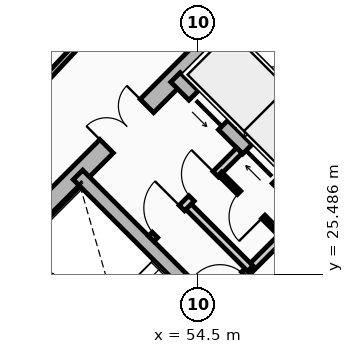
"""IFC4 building model, lengths in metres.
Left out: names, types, materials, properties, quantities, classifications, styles, units other than length and angle.
Written with IfcOpenShell. Run it as: python <this file> out.ifc"""

import sys

from ifc_helpers import new_model, si_unit, direction, frame, frame_2d, origin, place, context, subcontext, project, spatial, rectangle, extrude, source, transform, mapped, element, fill, save


model = new_model("IFC4")
c1 = context("Model", 3, precision=1e-05, world=origin(), true_north=direction((0.0, 1.0)))
c2 = subcontext(c1, "Body", "Model", "MODEL_VIEW")
j1 = project(units=[si_unit("LENGTHUNIT", "METRE"), si_unit("PLANEANGLEUNIT", "RADIAN")], contexts=[c1])
p1 = place(None, origin())
s1 = spatial("IfcSite", under=j1, at=p1, CompositionType="ELEMENT")
p2 = place(p1, origin())
s2 = spatial("IfcBuilding", under=s1, at=p2, CompositionType="ELEMENT")
p3 = place(p2, frame((0.0, 0.0, 62.74)))
s3 = spatial("IfcBuildingStorey", under=s2, at=p3, CompositionType="ELEMENT", Elevation=62.74)
for number, where, z_axis, x_axis in (
    (1, (58.773, 15.661, 0.0), (0.0, 0.0, 1.0), (-0.707, 0.707, 0.0)),
    (2, (66.339, 23.227, 0.0), (0.0, 0.0, 1.0), (-0.707, 0.707, 0.0)),
):
    element("IfcWall", number, at=place(p3, frame(where, z_axis=z_axis, x_axis=x_axis)), inside=s3, PredefinedType="SHEAR", context=c2, shape_type="SweptSolid", body=[
        extrude(rectangle(XDim=14.3, YDim=0.5, at=frame_2d((7.15, 0.0))), origin(), (0.0, 0.0, 1.0), 2.91),
    ])
p4 = place(p3, frame((48.838, 25.596, 0.0), z_axis=(0.0, 0.0, 1.0), x_axis=(0.707106781187, 0.707106781187, 0.0)))
e3 = element("IfcWall", 3, at=p4, inside=s3, PredefinedType="SHEAR", context=c2, shape_type="SweptSolid", body=[
    extrude(rectangle(XDim=10.7, YDim=0.5, at=frame_2d((5.35, 0.0))), origin(), (0.0, 0.0, 1.0), 2.91),
])
m1 = source(origin(), c2, "Body", "SweptSolid", [
    extrude(rectangle(XDim=1.5, YDim=2.02, at=frame_2d((0.75, 1.01))), frame((0.0, 0.26, 0.0), z_axis=(0.0, -1.0, 0.0), x_axis=(1.0, 0.0, 0.0)), (0.0, 0.0, 1.0), 0.52),
])
p5 = place(p4, frame((4.6, 0.0, 0.0)))
e4 = element("IfcOpeningElement", 4, at=p5, cuts=e3, PredefinedType="OPENING", context=c2, shape_type="MappedRepresentation", body=[
    mapped(m1, transform((0.0, 0.0, 0.0), x_axis=(1.0, 0.0, 0.0), y_axis=(0.0, 1.0, 0.0), z_axis=(0.0, 0.0, 1.0), scale=1.0)),
])
p6 = place(p3, frame((61.096, 18.338, 0.0), z_axis=(0.0, 0.0, 1.0), x_axis=(-0.707106781187, 0.707106781187, 0.0)))
e5 = element("IfcWall", 5, at=p6, inside=s3, PredefinedType="SHEAR", context=c2, shape_type="SweptSolid", body=[
    extrude(rectangle(XDim=13.8, YDim=0.35, at=frame_2d((6.9, 0.0))), origin(), (0.0, 0.0, 1.0), 2.91),
])
m2 = source(origin(), c2, "Body", "SweptSolid", [
    extrude(rectangle(XDim=1.1, YDim=2.015, at=frame_2d((0.55, 1.007))), frame((0.0, 0.185, 0.0), z_axis=(0.0, -1.0, 0.0), x_axis=(1.0, 0.0, 0.0)), (0.0, 0.0, 1.0), 0.37),
])
p7 = place(p6, frame((4.9, 0.0, 0.0)))
e6 = element("IfcOpeningElement", 6, at=p7, cuts=e5, PredefinedType="OPENING", context=c2, shape_type="MappedRepresentation", body=[
    mapped(m2, transform((0.0, 0.0, 0.0), x_axis=(1.0, 0.0, 0.0), y_axis=(0.0, 1.0, 0.0), z_axis=(0.0, 0.0, 1.0), scale=1.0)),
])
m3 = source(origin(), c2, "Body", "SweptSolid", [
    extrude(rectangle(XDim=1.15, YDim=2.02, at=frame_2d((0.575, 1.01))), frame((0.0, 0.185, 0.0), z_axis=(0.0, -1.0, 0.0), x_axis=(1.0, 0.0, 0.0)), (0.0, 0.0, 1.0), 0.37),
])
p8 = place(p6, frame((7.32, 0.0, 0.0)))
e7 = element("IfcOpeningElement", 7, at=p8, cuts=e5, PredefinedType="OPENING", context=c2, shape_type="MappedRepresentation", body=[
    mapped(m3, transform((0.0, 0.0, 0.0), x_axis=(1.0, 0.0, 0.0), y_axis=(0.0, 1.0, 0.0), z_axis=(0.0, 0.0, 1.0), scale=1.0)),
])
p9 = place(p3, frame((63.662, 20.904, 0.0), z_axis=(0.0, 0.0, 1.0), x_axis=(-0.707106781187, 0.707106781187, 0.0)))
e8 = element("IfcWall", 8, at=p9, inside=s3, PredefinedType="SHEAR", context=c2, shape_type="SweptSolid", body=[
    extrude(rectangle(XDim=13.8, YDim=0.35, at=frame_2d((6.9, 0.0))), origin(), (0.0, 0.0, 1.0), 2.91),
])
p10 = place(p9, frame((10.025, 0.0, 0.0)))
e9 = element("IfcOpeningElement", 9, at=p10, cuts=e8, PredefinedType="OPENING", context=c2, shape_type="MappedRepresentation", body=[
    mapped(m2, transform((0.0, 0.0, 0.0), x_axis=(1.0, 0.0, 0.0), y_axis=(0.0, 1.0, 0.0), z_axis=(0.0, 0.0, 1.0), scale=1.0)),
])
p11 = place(p9, frame((12.025, 0.0, 0.0)))
e10 = element("IfcOpeningElement", 10, at=p11, cuts=e8, PredefinedType="OPENING", context=c2, shape_type="MappedRepresentation", body=[
    mapped(m2, transform((0.0, 0.0, 0.0), x_axis=(1.0, 0.0, 0.0), y_axis=(0.0, 1.0, 0.0), z_axis=(0.0, 0.0, 1.0), scale=1.0)),
])
p12 = place(p9, frame((5.33, 0.0, 0.0)))
e11 = element("IfcOpeningElement", 11, at=p12, cuts=e8, PredefinedType="OPENING", context=c2, shape_type="MappedRepresentation", body=[
    mapped(m3, transform((0.0, 0.0, 0.0), x_axis=(1.0, 0.0, 0.0), y_axis=(0.0, 1.0, 0.0), z_axis=(0.0, 0.0, 1.0), scale=1.0)),
])
p13 = place(p3, frame((53.922, 21.141, 0.0), z_axis=(0.0, 0.0, 1.0), x_axis=(-0.707106781187, 0.707106781187, 0.0)))
e12 = element("IfcWall", 12, at=p13, inside=s3, PredefinedType="SHEAR", context=c2, shape_type="SweptSolid", body=[
    extrude(rectangle(XDim=6.745, YDim=0.35, at=frame_2d((3.373, 0.0))), origin(), (0.0, 0.0, 1.0), 2.91),
])
p14 = place(p3, frame((55.615, 29.227, 0.0), z_axis=(0.0, 0.0, 1.0), x_axis=(0.707147878904, 0.70706568108, 0.0)))
e13 = element("IfcWall", 13, at=p14, inside=s3, PredefinedType="SHEAR", context=c2, shape_type="SweptSolid", body=[
    extrude(rectangle(XDim=2.97, YDim=0.2, at=frame_2d((1.485, 0.0))), origin(), (0.0, 0.0, 1.0), 2.91),
])
p15 = place(p3, frame((57.419, 31.2, 0.0), z_axis=(0.0, 0.0, 1.0), x_axis=(-0.707032117043, 0.707181437447, 0.0)))
e14 = element("IfcWall", 14, at=p15, inside=s3, PredefinedType="SHEAR", context=c2, shape_type="SweptSolid", body=[
    extrude(rectangle(XDim=1.635, YDim=0.2, at=frame_2d((0.817, 0.0))), origin(), (0.0, 0.0, 1.0), 2.91),
])
p16 = place(p3, frame((54.961, 24.719, 0.0), z_axis=(0.0, 0.0, 1.0), x_axis=(0.707106781187, 0.707106781187, 0.0)))
e15 = element("IfcWall", 15, at=p16, inside=s3, PredefinedType="PARTITIONING", context=c2, shape_type="SweptSolid", body=[
    extrude(rectangle(XDim=3.28, YDim=0.2, at=frame_2d((1.64, 0.0))), origin(), (0.0, 0.0, 1.0), 2.555),
])
m4 = source(origin(), c2, "Body", "SweptSolid", [
    extrude(rectangle(XDim=0.9, YDim=2.005, at=frame_2d((0.45, 1.002))), frame((0.0, 0.11, 0.0), z_axis=(0.0, -1.0, 0.0), x_axis=(1.0, 0.0, 0.0)), (0.0, 0.0, 1.0), 0.22),
])
p17 = place(p16, frame((0.16, 0.0, 0.0)))
e16 = element("IfcOpeningElement", 16, at=p17, cuts=e15, PredefinedType="OPENING", context=c2, shape_type="MappedRepresentation", body=[
    mapped(m4, transform((0.0, 0.0, 0.0), x_axis=(1.0, 0.0, 0.0), y_axis=(0.0, 1.0, 0.0), z_axis=(0.0, 0.0, 1.0), scale=1.0)),
])
p18 = place(p3, frame((55.874, 25.631, 0.0), z_axis=(0.0, 0.0, 1.0), x_axis=(-0.707157639372, 0.707055919343, 0.0)))
e17 = element("IfcWall", 17, at=p18, inside=s3, PredefinedType="PARTITIONING", context=c2, shape_type="SweptSolid", body=[
    extrude(rectangle(XDim=2.4, YDim=0.2, at=frame_2d((1.2, 0.0))), origin(), (0.0, 0.0, 1.0), 2.555),
])
p19 = place(p3, frame((53.264, 26.416, 0.0), z_axis=(0.0, 0.0, 1.0), x_axis=(0.707106781187, 0.707106781187, 0.0)))
e18 = element("IfcWall", 18, at=p19, inside=s3, PredefinedType="PARTITIONING", context=c2, shape_type="SweptSolid", body=[
    extrude(rectangle(XDim=3.28, YDim=0.2, at=frame_2d((1.64, 0.0))), origin(), (0.0, 0.0, 1.0), 2.555),
])
m5 = source(origin(), c2, "Body", "SweptSolid", [
    extrude(rectangle(XDim=1.0, YDim=2.015, at=frame_2d((0.5, 1.007))), frame((0.0, 0.11, 0.0), z_axis=(0.0, -1.0, 0.0), x_axis=(1.0, 0.0, 0.0)), (0.0, 0.0, 1.0), 0.22),
])
p20 = place(p19, frame((0.14, 0.0, 0.0)))
e19 = element("IfcOpeningElement", 19, at=p20, cuts=e18, PredefinedType="OPENING", context=c2, shape_type="MappedRepresentation", body=[
    mapped(m5, transform((0.0, 0.0, 0.0), x_axis=(1.0, 0.0, 0.0), y_axis=(0.0, 1.0, 0.0), z_axis=(0.0, 0.0, 1.0), scale=1.0)),
])
p21 = place(p19, frame((1.5, 0.0, 0.0)))
e20 = element("IfcOpeningElement", 20, at=p21, cuts=e18, PredefinedType="OPENING", context=c2, shape_type="MappedRepresentation", body=[
    mapped(m4, transform((0.0, 0.0, 0.0), x_axis=(1.0, 0.0, 0.0), y_axis=(0.0, 1.0, 0.0), z_axis=(0.0, 0.0, 1.0), scale=1.0)),
])
p22 = place(p3, frame((56.673, 26.529, 0.0), z_axis=(0.0, 0.0, 1.0), x_axis=(-0.707052764397, 0.70716079385, 0.0)))
e21 = element("IfcWall", 21, at=p22, inside=s3, PredefinedType="PARTITIONING", context=c2, shape_type="SweptSolid", body=[
    extrude(rectangle(XDim=2.26, YDim=0.125, at=frame_2d((1.13, 0.0))), origin(), (0.0, 0.0, 1.0), 2.555),
])
m6 = source(origin(), c2, "Body", "SweptSolid", [
    extrude(rectangle(XDim=0.9, YDim=2.005, at=frame_2d((0.45, 1.002))), frame((0.0, 0.073, 0.0), z_axis=(0.0, -1.0, 0.0), x_axis=(1.0, 0.0, 0.0)), (0.0, 0.0, 1.0), 0.145),
])
p23 = place(p22, frame((0.65, 0.0, 0.0)))
e22 = element("IfcOpeningElement", 22, at=p23, cuts=e21, PredefinedType="OPENING", context=c2, shape_type="MappedRepresentation", body=[
    mapped(m6, transform((0.0, 0.0, 0.0), x_axis=(1.0, 0.0, 0.0), y_axis=(0.0, 1.0, 0.0), z_axis=(0.0, 0.0, 1.0), scale=1.0)),
])
p24 = place(p3, frame((52.043, 32.28, 0.0), z_axis=(0.0, 0.0, 1.0), x_axis=(-0.682606081633, -0.730786519661, 0.0)))
e23 = element("IfcWall", 23, at=p24, inside=s3, PredefinedType="PARTITIONING", context=c2, shape_type="SweptSolid", body=[
    extrude(rectangle(XDim=6.527, YDim=0.15, at=frame_2d((3.263, 0.0))), origin(), (0.0, 0.0, 1.0), 2.079),
])
m7 = source(origin(), c2, "Body", "SweptSolid", [
    extrude(rectangle(XDim=1.1, YDim=2.015, at=frame_2d((0.55, 1.007))), frame((0.0, 0.025, 0.0), z_axis=(0.0, -1.0, 0.0), x_axis=(1.0, 0.0, 0.0)), (0.0, 0.0, 1.0), 0.05),
])
p25 = place(p10, origin())
e24 = element("IfcDoor", 24, at=p25, inside=s3, OperationType="SLIDING_TO_RIGHT", PredefinedType="DOOR", context=c2, shape_type="MappedRepresentation", body=[
    mapped(m7, transform((0.0, 0.0, 0.0), x_axis=(1.0, 0.0, 0.0), y_axis=(0.0, 1.0, 0.0), z_axis=(0.0, 0.0, 1.0), scale=1.0)),
])
fill(e9, e24)
p26 = place(p11, origin())
e25 = element("IfcDoor", 25, at=p26, inside=s3, OperationType="SLIDING_TO_LEFT", PredefinedType="DOOR", context=c2, shape_type="MappedRepresentation", body=[
    mapped(m7, transform((0.0, 0.0, 0.0), x_axis=(1.0, 0.0, 0.0), y_axis=(0.0, 1.0, 0.0), z_axis=(0.0, 0.0, 1.0), scale=1.0)),
])
fill(e10, e25)
m8 = source(origin(), c2, "Body", "SweptSolid", [
    extrude(rectangle(XDim=1.5, YDim=2.02, at=frame_2d((0.75, 1.01))), frame((0.0, 0.025, 0.0), z_axis=(0.0, -1.0, 0.0), x_axis=(1.0, 0.0, 0.0)), (0.0, 0.0, 1.0), 0.05),
])
p27 = place(p5, origin())
e26 = element("IfcDoor", 26, at=p27, inside=s3, OperationType="DOUBLE_DOOR_SINGLE_SWING", PredefinedType="DOOR", context=c2, shape_type="MappedRepresentation", body=[
    mapped(m8, transform((0.0, 0.0, 0.0), x_axis=(1.0, 0.0, 0.0), y_axis=(0.0, 1.0, 0.0), z_axis=(0.0, 0.0, 1.0), scale=1.0)),
])
fill(e4, e26)
m9 = source(origin(), c2, "Body", "SweptSolid", [
    extrude(rectangle(XDim=0.9, YDim=2.005, at=frame_2d((0.45, 1.002))), frame((0.0, 0.025, 0.0), z_axis=(0.0, -1.0, 0.0), x_axis=(1.0, 0.0, 0.0)), (0.0, 0.0, 1.0), 0.05),
])
p28 = place(p17, origin())
e27 = element("IfcDoor", 27, at=p28, inside=s3, OperationType="SINGLE_SWING_LEFT", PredefinedType="DOOR", context=c2, shape_type="MappedRepresentation", body=[
    mapped(m9, transform((0.0, 0.0, 0.0), x_axis=(1.0, 0.0, 0.0), y_axis=(0.0, 1.0, 0.0), z_axis=(0.0, 0.0, 1.0), scale=1.0)),
])
fill(e16, e27)
m10 = source(origin(), c2, "Body", "SweptSolid", [
    extrude(rectangle(XDim=1.0, YDim=2.015, at=frame_2d((0.5, 1.007))), frame((0.0, 0.025, 0.0), z_axis=(0.0, -1.0, 0.0), x_axis=(1.0, 0.0, 0.0)), (0.0, 0.0, 1.0), 0.05),
])
p29 = place(p20, origin())
e28 = element("IfcDoor", 28, at=p29, inside=s3, OperationType="SINGLE_SWING_RIGHT", PredefinedType="DOOR", context=c2, shape_type="MappedRepresentation", body=[
    mapped(m10, transform((0.0, 0.0, 0.0), x_axis=(1.0, 0.0, 0.0), y_axis=(0.0, 1.0, 0.0), z_axis=(0.0, 0.0, 1.0), scale=1.0)),
])
fill(e19, e28)
p30 = place(p21, origin())
e29 = element("IfcDoor", 29, at=p30, inside=s3, OperationType="SINGLE_SWING_RIGHT", PredefinedType="DOOR", context=c2, shape_type="MappedRepresentation", body=[
    mapped(m9, transform((0.0, 0.0, 0.0), x_axis=(1.0, 0.0, 0.0), y_axis=(0.0, 1.0, 0.0), z_axis=(0.0, 0.0, 1.0), scale=1.0)),
])
fill(e20, e29)
p31 = place(p23, origin())
e30 = element("IfcDoor", 30, at=p31, inside=s3, OperationType="SINGLE_SWING_LEFT", PredefinedType="DOOR", context=c2, shape_type="MappedRepresentation", body=[
    mapped(m9, transform((0.0, 0.0, 0.0), x_axis=(1.0, 0.0, 0.0), y_axis=(0.0, 1.0, 0.0), z_axis=(0.0, 0.0, 1.0), scale=1.0)),
])
fill(e22, e30)
save(model, sys.argv[1])
